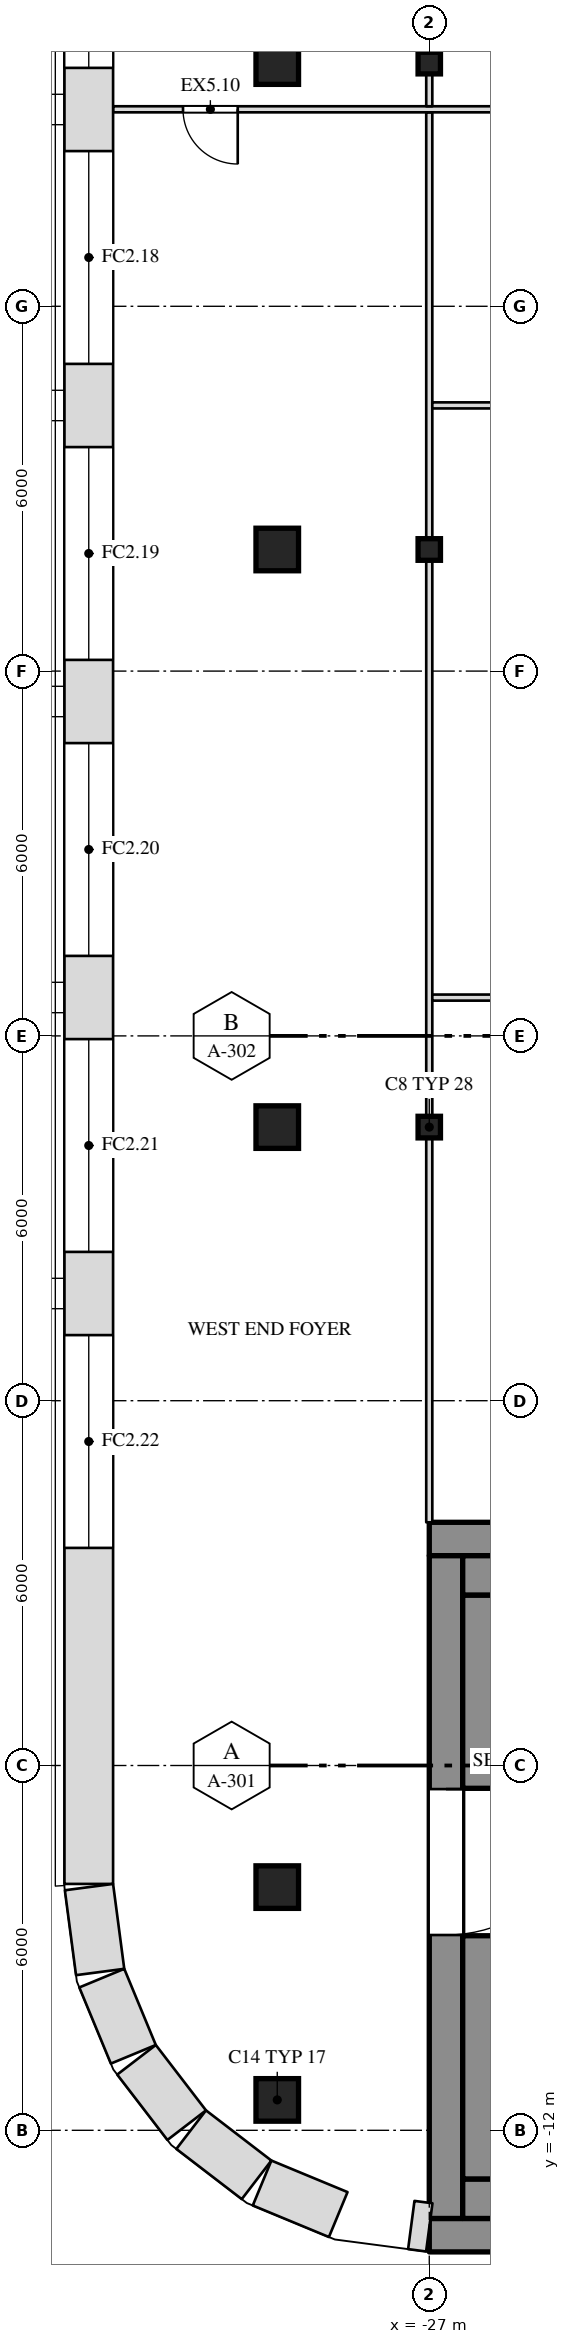
"""IFC4 building model, lengths in metres.
Left out: names, types, materials, properties, quantities, classifications, styles, units other than length and angle.
Written with IfcOpenShell. Run it as: python <this file> out.ifc"""

import sys

from ifc_helpers import new_model, si_unit, direction, frame, frame_2d, origin, origin_2d, place, context, subcontext, project, spatial, rectangle, i_section, extrude, element, fill, save


model = new_model("IFC4")
c1 = context("Model", 3, precision=1e-05, world=origin(), true_north=direction((0.0, 1.0)))
c2 = subcontext(c1, "Body", "Model", "MODEL_VIEW")
j1 = project(units=[si_unit("LENGTHUNIT", "METRE"), si_unit("PLANEANGLEUNIT", "RADIAN")], contexts=[c1])
p1 = place(None, origin())
s1 = spatial("IfcSite", under=j1, at=p1, CompositionType="ELEMENT")
p2 = place(p1, origin())
s2 = spatial("IfcBuilding", under=s1, at=p2, CompositionType="ELEMENT")
p3 = place(p2, frame((0.0, 0.0, 288.5)))
s3 = spatial("IfcBuildingStorey", under=s2, at=p3, CompositionType="ELEMENT", Elevation=288.5)
for number, where, z_axis, x_axis in (
    (1, (-29.5, -11.5, 0.0), (0.0, 0.0, 1.0), (1.0, 0.0, 0.0)),
    (2, (-29.5, -8.0, 0.0), (0.0, 0.0, 1.0), (1.0, 0.0, 0.0)),
    (3, (-29.5, 4.5, 0.0), (0.0, 0.0, 1.0), (1.0, 0.0, 0.0)),
):
    element("IfcColumn", number, at=place(p3, frame(where, z_axis=z_axis, x_axis=x_axis)), inside=s3, PredefinedType="COLUMN", context=c2, shape_type="SweptSolid", body=[
        extrude(rectangle(XDim=0.7, YDim=0.7, at=origin_2d()), origin(), (0.0, 0.0, 1.0), 4.0),
    ])
p4 = place(p3, frame((-27.0, 4.5, 0.0), z_axis=(0.0, 0.0, 1.0), x_axis=(1.0, 0.0, 0.0)))
e4 = element("IfcColumn", 4, at=p4, inside=s3, PredefinedType="COLUMN", context=c2, shape_type="SweptSolid", body=[
    extrude(i_section(OverallWidth=0.368, OverallDepth=0.356, WebThickness=0.011, FlangeThickness=0.018, at=origin_2d()), origin(), (0.0, 0.0, 1.0), 4.0),
])
p5 = place(p3, frame((-29.5, 14.0, 0.0), z_axis=(0.0, 0.0, 1.0), x_axis=(1.0, 0.0, 0.0)))
e5 = element("IfcColumn", 5, at=p5, inside=s3, PredefinedType="COLUMN", context=c2, shape_type="SweptSolid", body=[
    extrude(rectangle(XDim=0.7, YDim=0.7, at=origin_2d()), origin(), (0.0, 0.0, 1.0), 4.0),
])
p6 = place(p3, frame((-27.0, 14.0, 0.0), z_axis=(0.0, 0.0, 1.0), x_axis=(1.0, 0.0, 0.0)))
e6 = element("IfcColumn", 6, at=p6, inside=s3, PredefinedType="COLUMN", context=c2, shape_type="SweptSolid", body=[
    extrude(i_section(OverallWidth=0.368, OverallDepth=0.356, WebThickness=0.011, FlangeThickness=0.018, at=origin_2d()), origin(), (0.0, 0.0, 1.0), 4.0),
])
p7 = place(p3, frame((-29.5, 22.0, 0.0), z_axis=(0.0, 0.0, 1.0), x_axis=(1.0, 0.0, 0.0)))
e7 = element("IfcColumn", 7, at=p7, inside=s3, PredefinedType="COLUMN", context=c2, shape_type="SweptSolid", body=[
    extrude(rectangle(XDim=0.7, YDim=0.7, at=origin_2d()), origin(), (0.0, 0.0, 1.0), 4.0),
])
p8 = place(p3, frame((-27.0, 22.0, 0.0), z_axis=(0.0, 0.0, 1.0), x_axis=(1.0, 0.0, 0.0)))
e8 = element("IfcColumn", 8, at=p8, inside=s3, PredefinedType="COLUMN", context=c2, shape_type="SweptSolid", body=[
    extrude(i_section(OverallWidth=0.368, OverallDepth=0.356, WebThickness=0.011, FlangeThickness=0.018, at=origin_2d()), origin(), (0.0, 0.0, 1.0), 4.0),
])
p9 = place(p3, frame((-27.0, -2.275, 0.0), z_axis=(0.0, 0.0, 1.0), x_axis=(1.0, 0.0, 0.0)))
e9 = element("IfcWall", 9, at=p9, inside=s3, PredefinedType="SHEAR", context=c2, shape_type="SweptSolid", body=[
    extrude(rectangle(XDim=54.0, YDim=0.55, at=frame_2d((27.0, 0.0))), origin(), (0.0, 0.0, 1.0), 3.78),
])
p10 = place(p9, frame((15.15, 0.0, 0.0)))
e10 = element("IfcOpeningElement", 10, at=p10, cuts=e9, PredefinedType="OPENING", context=c2, shape_type="SweptSolid", body=[
    extrude(rectangle(XDim=2.4, YDim=2.1, at=frame_2d((1.2, 1.05))), frame((0.0, 0.287, 0.0), z_axis=(0.0, -1.0, 0.0), x_axis=(1.0, 0.0, 0.0)), (0.0, 0.0, 1.0), 0.574),
])
p11 = place(p9, frame((36.45, 0.0, 0.0)))
e11 = element("IfcOpeningElement", 11, at=p11, cuts=e9, PredefinedType="OPENING", context=c2, shape_type="SweptSolid", body=[
    extrude(rectangle(XDim=2.4, YDim=2.1, at=frame_2d((1.2, 1.05))), frame((0.0, 0.287, 0.0), z_axis=(0.0, -1.0, 0.0), x_axis=(1.0, 0.0, 0.0)), (0.0, 0.0, 1.0), 0.574),
])
p12 = place(p3, frame((-27.0, -13.725, 0.0), z_axis=(0.0, 0.0, 1.0), x_axis=(1.0, 0.0, 0.0)))
e12 = element("IfcWall", 12, at=p12, inside=s3, PredefinedType="SHEAR", context=c2, shape_type="SweptSolid", body=[
    extrude(rectangle(XDim=54.0, YDim=0.55, at=frame_2d((27.0, 0.0))), origin(), (0.0, 0.0, 1.0), 3.78),
])
p13 = place(p3, frame((-26.725, -13.45, 0.0), z_axis=(0.0, 0.0, 1.0), x_axis=(0.0, 1.0, 0.0)))
e13 = element("IfcWall", 13, at=p13, inside=s3, PredefinedType="SHEAR", context=c2, shape_type="SweptSolid", body=[
    extrude(rectangle(XDim=10.9, YDim=0.55, at=frame_2d((5.45, 0.0))), origin(), (0.0, 0.0, 1.0), 3.78),
])
p14 = place(p13, frame((4.662, 0.0, 0.0)))
e14 = element("IfcOpeningElement", 14, at=p14, cuts=e13, PredefinedType="OPENING", context=c2, shape_type="SweptSolid", body=[
    extrude(rectangle(XDim=2.4, YDim=2.1, at=frame_2d((1.2, 1.05))), frame((0.0, 0.287, 0.0), z_axis=(0.0, -1.0, 0.0), x_axis=(1.0, 0.0, 0.0)), (0.0, 0.0, 1.0), 0.574),
])
p15 = place(p3, frame((-26.45, -2.875, 0.0), z_axis=(0.0, 0.0, 1.0), x_axis=(1.0, 0.0, 0.0)))
e15 = element("IfcWall", 15, at=p15, inside=s3, PredefinedType="SHEAR", context=c2, shape_type="SweptSolid", body=[
    extrude(rectangle(XDim=14.45, YDim=0.65, at=frame_2d((7.225, 0.0))), origin(), (0.0, 0.0, 1.0), 3.78),
])
p16 = place(p3, frame((-26.45, -13.125, 0.0), z_axis=(0.0, 0.0, 1.0), x_axis=(1.0, 0.0, 0.0)))
e16 = element("IfcWall", 16, at=p16, inside=s3, PredefinedType="SHEAR", context=c2, shape_type="SweptSolid", body=[
    extrude(rectangle(XDim=52.9, YDim=0.65, at=frame_2d((26.45, 0.0))), origin(), (0.0, 0.0, 1.0), 3.78),
])
p17 = place(p3, frame((-26.125, -12.8, 0.0), z_axis=(0.0, 0.0, 1.0), x_axis=(0.0, 1.0, 0.0)))
e17 = element("IfcWall", 17, at=p17, inside=s3, PredefinedType="SHEAR", context=c2, shape_type="SweptSolid", body=[
    extrude(rectangle(XDim=4.0, YDim=0.65, at=frame_2d((2.0, 0.0))), origin(), (0.0, 0.0, 1.0), 3.78),
])
p18 = place(p3, frame((-26.125, -6.375, 0.0), z_axis=(0.0, 0.0, 1.0), x_axis=(0.0, 1.0, 0.0)))
e18 = element("IfcWall", 18, at=p18, inside=s3, PredefinedType="SHEAR", context=c2, shape_type="SweptSolid", body=[
    extrude(rectangle(XDim=3.175, YDim=0.65, at=frame_2d((1.587, 0.0))), origin(), (0.0, 0.0, 1.0), 3.78),
])
p19 = place(p3, frame((-27.0, -2.0, 0.0), z_axis=(0.0, 0.0, 1.0), x_axis=(0.0, 1.0, 0.0)))
e19 = element("IfcWall", 19, at=p19, inside=s3, PredefinedType="PARTITIONING", context=c2, shape_type="SweptSolid", body=[
    extrude(rectangle(XDim=6.322, YDim=0.1, at=frame_2d((3.161, 0.0))), origin(), (0.0, 0.0, 1.0), 3.247),
])
p20 = place(p3, frame((-27.0, 4.678, 0.0), z_axis=(0.0, 0.0, 1.0), x_axis=(0.0, 1.0, 0.0)))
e20 = element("IfcWall", 20, at=p20, inside=s3, PredefinedType="PARTITIONING", context=c2, shape_type="SweptSolid", body=[
    extrude(rectangle(XDim=9.145, YDim=0.1, at=frame_2d((4.572, 0.0))), origin(), (0.0, 0.0, 1.0), 3.247),
])
p21 = place(p3, frame((-27.0, 14.178, 0.0), z_axis=(0.0, 0.0, 1.0), x_axis=(0.0, 1.0, 0.0)))
e21 = element("IfcWall", 21, at=p21, inside=s3, PredefinedType="PARTITIONING", context=c2, shape_type="SweptSolid", body=[
    extrude(rectangle(XDim=7.012, YDim=0.1, at=frame_2d((3.506, 0.0))), origin(), (0.0, 0.0, 1.0), 3.247),
])
p22 = place(p3, frame((-26.95, 6.63, 0.0), z_axis=(0.0, 0.0, 1.0), x_axis=(1.0, 0.0, 0.0)))
e22 = element("IfcWall", 22, at=p22, inside=s3, PredefinedType="PARTITIONING", context=c2, shape_type="SweptSolid", body=[
    extrude(rectangle(XDim=30.0, YDim=0.1, at=frame_2d((15.0, 0.0))), origin(), (0.0, 0.0, 1.0), 3.78),
])
p23 = place(p22, frame((20.8, 0.0, 0.0)))
e23 = element("IfcOpeningElement", 23, at=p23, cuts=e22, PredefinedType="OPENING", context=c2, shape_type="SweptSolid", body=[
    extrude(rectangle(XDim=1.8, YDim=2.1, at=frame_2d((0.9, 1.05))), frame((0.0, 0.062, 0.0), z_axis=(0.0, -1.0, 0.0), x_axis=(1.0, 0.0, 0.0)), (0.0, 0.0, 1.0), 0.124),
])
p24 = place(p3, frame((-26.95, 16.37, 0.0), z_axis=(0.0, 0.0, 1.0), x_axis=(1.0, 0.0, 0.0)))
e24 = element("IfcWall", 24, at=p24, inside=s3, PredefinedType="PARTITIONING", context=c2, shape_type="SweptSolid", body=[
    extrude(rectangle(XDim=30.0, YDim=0.1, at=frame_2d((15.0, 0.0))), origin(), (0.0, 0.0, 1.0), 3.78),
])
p25 = place(p24, frame((6.25, 0.0, 0.0)))
e25 = element("IfcOpeningElement", 25, at=p25, cuts=e24, PredefinedType="OPENING", context=c2, shape_type="SweptSolid", body=[
    extrude(rectangle(XDim=0.9, YDim=2.1, at=frame_2d((0.45, 1.05))), frame((0.0, 0.062, 0.0), z_axis=(0.0, -1.0, 0.0), x_axis=(1.0, 0.0, 0.0)), (0.0, 0.0, 1.0), 0.124),
])
p26 = place(p3, frame((-32.2, 21.24, 0.0), z_axis=(0.0, 0.0, 1.0), x_axis=(1.0, 0.0, 0.0)))
e26 = element("IfcWall", 26, at=p26, inside=s3, PredefinedType="PARTITIONING", context=c2, shape_type="SweptSolid", body=[
    extrude(rectangle(XDim=35.25, YDim=0.1, at=frame_2d((17.625, 0.0))), origin(), (0.0, 0.0, 1.0), 3.78),
])
p27 = place(p26, frame((1.15, 0.0, 0.0)))
e27 = element("IfcOpeningElement", 27, at=p27, cuts=e26, PredefinedType="OPENING", context=c2, shape_type="SweptSolid", body=[
    extrude(rectangle(XDim=0.9, YDim=2.1, at=frame_2d((0.45, 1.05))), frame((0.0, 0.062, 0.0), z_axis=(0.0, -1.0, 0.0), x_axis=(1.0, 0.0, 0.0)), (0.0, 0.0, 1.0), 0.124),
])
p28 = place(p26, frame((11.9, 0.0, 0.0)))
e28 = element("IfcOpeningElement", 28, at=p28, cuts=e26, PredefinedType="OPENING", context=c2, shape_type="SweptSolid", body=[
    extrude(rectangle(XDim=1.8, YDim=2.1, at=frame_2d((0.9, 1.05))), frame((0.0, 0.062, 0.0), z_axis=(0.0, -1.0, 0.0), x_axis=(1.0, 0.0, 0.0)), (0.0, 0.0, 1.0), 0.124),
])
p29 = place(p3, frame((-27.0, 21.29, 0.0), z_axis=(0.0, 0.0, 1.0), x_axis=(0.0, 1.0, 0.0)))
e29 = element("IfcWall", 29, at=p29, inside=s3, PredefinedType="PARTITIONING", context=c2, shape_type="SweptSolid", body=[
    extrude(rectangle(XDim=0.532, YDim=0.1, at=frame_2d((0.266, 0.0))), origin(), (0.0, 0.0, 1.0), 3.247),
])
p30 = place(p3, frame((-27.0, 22.178, 0.0), z_axis=(0.0, 0.0, 1.0), x_axis=(0.0, 1.0, 0.0)))
e30 = element("IfcWall", 30, at=p30, inside=s3, PredefinedType="PARTITIONING", context=c2, shape_type="SweptSolid", body=[
    extrude(rectangle(XDim=5.645, YDim=0.1, at=frame_2d((2.822, 0.0))), origin(), (0.0, 0.0, 1.0), 3.247),
])
p31 = place(p3, frame((-32.6, 30.948, 0.0), z_axis=(0.0, 0.0, 1.0), x_axis=(0.0, -1.0, 0.0)))
e31 = element("IfcWall", 31, at=p31, inside=s3, PredefinedType="SOLIDWALL", context=c2, shape_type="SweptSolid", body=[
    extrude(rectangle(XDim=38.895, YDim=0.8, at=frame_2d((19.448, 0.0))), origin(), (0.0, 0.0, 1.0), 3.78),
])
p32 = place(p31, frame((5.526, 0.0, 1.0)))
e32 = element("IfcOpeningElement", 32, at=p32, cuts=e31, PredefinedType="OPENING", context=c2, shape_type="SweptSolid", body=[
    extrude(rectangle(XDim=3.5, YDim=2.5, at=frame_2d((1.75, 1.25))), frame((0.0, 0.412, 0.0), z_axis=(0.0, -1.0, 0.0), x_axis=(1.0, 0.0, 0.0)), (0.0, 0.0, 1.0), 0.824),
])
p33 = place(p31, frame((10.395, 0.0, 1.0)))
e33 = element("IfcOpeningElement", 33, at=p33, cuts=e31, PredefinedType="OPENING", context=c2, shape_type="SweptSolid", body=[
    extrude(rectangle(XDim=3.5, YDim=2.5, at=frame_2d((1.75, 1.25))), frame((0.0, 0.412, 0.0), z_axis=(0.0, -1.0, 0.0), x_axis=(1.0, 0.0, 0.0)), (0.0, 0.0, 1.0), 0.824),
])
p34 = place(p31, frame((15.263, 0.0, 1.0)))
e34 = element("IfcOpeningElement", 34, at=p34, cuts=e31, PredefinedType="OPENING", context=c2, shape_type="SweptSolid", body=[
    extrude(rectangle(XDim=3.5, YDim=2.5, at=frame_2d((1.75, 1.25))), frame((0.0, 0.412, 0.0), z_axis=(0.0, -1.0, 0.0), x_axis=(1.0, 0.0, 0.0)), (0.0, 0.0, 1.0), 0.824),
])
p35 = place(p31, frame((20.132, 0.0, 1.0)))
e35 = element("IfcOpeningElement", 35, at=p35, cuts=e31, PredefinedType="OPENING", context=c2, shape_type="SweptSolid", body=[
    extrude(rectangle(XDim=3.5, YDim=2.5, at=frame_2d((1.75, 1.25))), frame((0.0, 0.412, 0.0), z_axis=(0.0, -1.0, 0.0), x_axis=(1.0, 0.0, 0.0)), (0.0, 0.0, 1.0), 0.824),
])
p36 = place(p31, frame((25.0, 0.0, 1.0)))
e36 = element("IfcOpeningElement", 36, at=p36, cuts=e31, PredefinedType="OPENING", context=c2, shape_type="SweptSolid", body=[
    extrude(rectangle(XDim=3.5, YDim=2.5, at=frame_2d((1.75, 1.25))), frame((0.0, 0.412, 0.0), z_axis=(0.0, -1.0, 0.0), x_axis=(1.0, 0.0, 0.0)), (0.0, 0.0, 1.0), 0.824),
])
p37 = place(p31, frame((29.869, 0.0, 1.0)))
e37 = element("IfcOpeningElement", 37, at=p37, cuts=e31, PredefinedType="OPENING", context=c2, shape_type="SweptSolid", body=[
    extrude(rectangle(XDim=3.5, YDim=2.5, at=frame_2d((1.75, 1.25))), frame((0.0, 0.412, 0.0), z_axis=(0.0, -1.0, 0.0), x_axis=(1.0, 0.0, 0.0)), (0.0, 0.0, 1.0), 0.824),
])
p38 = place(p3, frame((-32.597, -8.0, 0.0), z_axis=(0.0, 0.0, 1.0), x_axis=(0.130517283865, -0.99144603414, 0.0)))
e38 = element("IfcWall", 38, at=p38, inside=s3, PredefinedType="SOLIDWALL", context=c2, shape_type="SweptSolid", body=[
    extrude(rectangle(XDim=1.408, YDim=0.8, at=frame_2d((0.704, 0.0))), origin(), (0.0, 0.0, 1.0), 3.78),
])
p39 = place(p3, frame((-32.386, -9.497, 0.0), z_axis=(0.0, 0.0, 1.0), x_axis=(0.38276009378, -0.923847774587, 0.0)))
e39 = element("IfcWall", 39, at=p39, inside=s3, PredefinedType="SOLIDWALL", context=c2, shape_type="SweptSolid", body=[
    extrude(rectangle(XDim=1.355, YDim=0.8, at=frame_2d((0.678, 0.0))), origin(), (0.0, 0.0, 1.0), 3.78),
])
for number, where, z_axis, x_axis in (
    (40, (-31.815, -10.84, 0.0), (0.0, 0.0, 1.0), (0.609, -0.793, 0.0)),
    (41, (-30.916, -11.989, 0.0), (0.0, 0.0, 1.0), (0.793, -0.609, 0.0)),
):
    element("IfcWall", number, at=place(p3, frame(where, z_axis=z_axis, x_axis=x_axis)), inside=s3, PredefinedType="SOLIDWALL", context=c2, shape_type="SweptSolid", body=[
        extrude(rectangle(XDim=1.356, YDim=0.8, at=frame_2d((0.678, 0.0))), origin(), (0.0, 0.0, 1.0), 3.78),
    ])
p40 = place(p3, frame((-29.75, -12.867, 0.0), z_axis=(0.0, 0.0, 1.0), x_axis=(0.923847774587, -0.38276009378, 0.0)))
e42 = element("IfcWall", 42, at=p40, inside=s3, PredefinedType="SOLIDWALL", context=c2, shape_type="SweptSolid", body=[
    extrude(rectangle(XDim=1.355, YDim=0.8, at=frame_2d((0.678, 0.0))), origin(), (0.0, 0.0, 1.0), 3.78),
])
p41 = place(p3, frame((-27.296, -13.558, 0.0), z_axis=(0.0, 0.0, 1.0), x_axis=(0.991398522068, -0.130877692682, 0.0)))
e43 = element("IfcWall", 43, at=p41, inside=s3, PredefinedType="SOLIDWALL", context=c2, shape_type="SweptSolid", body=[
    extrude(rectangle(XDim=0.299, YDim=0.8, at=frame_2d((0.149, 0.0))), origin(), (0.0, 0.0, 1.0), 3.78),
])
p42 = place(p27, origin())
e44 = element("IfcDoor", 44, at=p42, inside=s3, OperationType="SINGLE_SWING_LEFT", PredefinedType="DOOR", context=c2, shape_type="SweptSolid", body=[
    extrude(rectangle(XDim=0.9, YDim=2.1, at=frame_2d((0.45, 1.05))), frame((0.0, 0.025, 0.0), z_axis=(0.0, -1.0, 0.0), x_axis=(1.0, 0.0, 0.0)), (0.0, 0.0, 1.0), 0.05),
])
fill(e27, e44)
p43 = place(p32, origin())
e45 = element("IfcWindow", 45, at=p43, inside=s3, PartitioningType="SINGLE_PANEL", PredefinedType="WINDOW", context=c2, shape_type="SweptSolid", body=[
    extrude(rectangle(XDim=3.5, YDim=2.5, at=frame_2d((1.75, 1.25))), frame((0.0, 0.03, 0.0), z_axis=(0.0, -1.0, 0.0), x_axis=(1.0, 0.0, 0.0)), (0.0, 0.0, 1.0), 0.06),
])
fill(e32, e45)
p44 = place(p33, origin())
e46 = element("IfcWindow", 46, at=p44, inside=s3, PartitioningType="SINGLE_PANEL", PredefinedType="WINDOW", context=c2, shape_type="SweptSolid", body=[
    extrude(rectangle(XDim=3.5, YDim=2.5, at=frame_2d((1.75, 1.25))), frame((0.0, 0.03, 0.0), z_axis=(0.0, -1.0, 0.0), x_axis=(1.0, 0.0, 0.0)), (0.0, 0.0, 1.0), 0.06),
])
fill(e33, e46)
p45 = place(p34, origin())
e47 = element("IfcWindow", 47, at=p45, inside=s3, PartitioningType="SINGLE_PANEL", PredefinedType="WINDOW", context=c2, shape_type="SweptSolid", body=[
    extrude(rectangle(XDim=3.5, YDim=2.5, at=frame_2d((1.75, 1.25))), frame((0.0, 0.03, 0.0), z_axis=(0.0, -1.0, 0.0), x_axis=(1.0, 0.0, 0.0)), (0.0, 0.0, 1.0), 0.06),
])
fill(e34, e47)
p46 = place(p35, origin())
e48 = element("IfcWindow", 48, at=p46, inside=s3, PartitioningType="SINGLE_PANEL", PredefinedType="WINDOW", context=c2, shape_type="SweptSolid", body=[
    extrude(rectangle(XDim=3.5, YDim=2.5, at=frame_2d((1.75, 1.25))), frame((0.0, 0.03, 0.0), z_axis=(0.0, -1.0, 0.0), x_axis=(1.0, 0.0, 0.0)), (0.0, 0.0, 1.0), 0.06),
])
fill(e35, e48)
p47 = place(p36, origin())
e49 = element("IfcWindow", 49, at=p47, inside=s3, PartitioningType="SINGLE_PANEL", PredefinedType="WINDOW", context=c2, shape_type="SweptSolid", body=[
    extrude(rectangle(XDim=3.5, YDim=2.5, at=frame_2d((1.75, 1.25))), frame((0.0, 0.03, 0.0), z_axis=(0.0, -1.0, 0.0), x_axis=(1.0, 0.0, 0.0)), (0.0, 0.0, 1.0), 0.06),
])
fill(e36, e49)
p48 = place(p37, origin())
e50 = element("IfcWindow", 50, at=p48, inside=s3, PartitioningType="SINGLE_PANEL", PredefinedType="WINDOW", context=c2, shape_type="SweptSolid", body=[
    extrude(rectangle(XDim=3.5, YDim=2.5, at=frame_2d((1.75, 1.25))), frame((0.0, 0.03, 0.0), z_axis=(0.0, -1.0, 0.0), x_axis=(1.0, 0.0, 0.0)), (0.0, 0.0, 1.0), 0.06),
])
fill(e37, e50)
p49 = place(p14, origin())
e51 = element("IfcDoor", 51, at=p49, inside=s3, OperationType="DOUBLE_DOOR_SINGLE_SWING", PredefinedType="DOOR", context=c2, shape_type="SweptSolid", body=[
    extrude(rectangle(XDim=2.4, YDim=2.1, at=frame_2d((1.2, 1.05))), frame((0.0, 0.025, 0.0), z_axis=(0.0, -1.0, 0.0), x_axis=(1.0, 0.0, 0.0)), (0.0, 0.0, 1.0), 0.05),
])
fill(e14, e51)
save(model, sys.argv[1])
